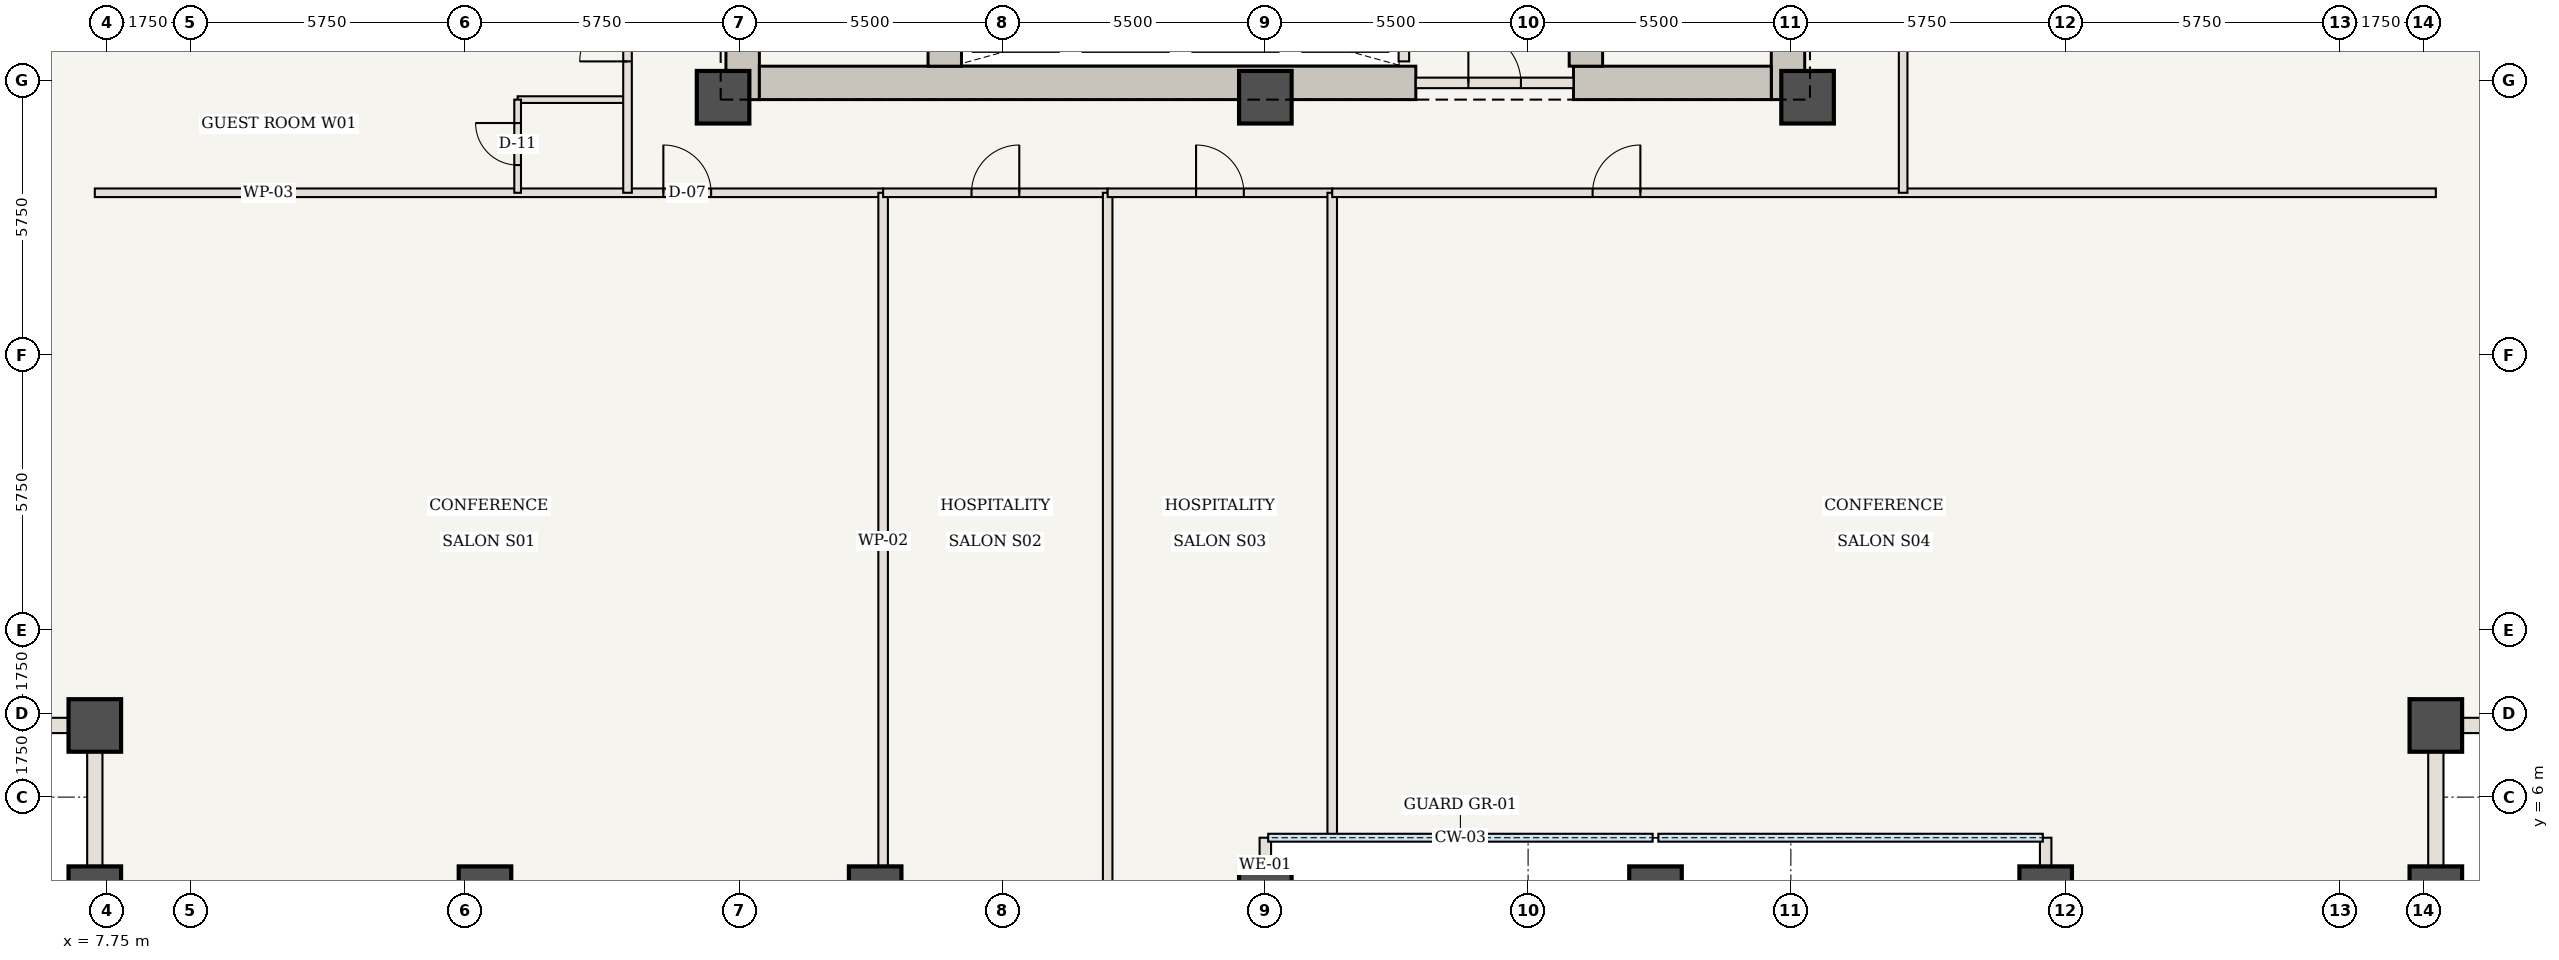
"""IFC4 building model, lengths in metres.
Left out: names, types, materials, properties, quantities, classifications, styles, units other than length and angle.
Written with IfcOpenShell. Run it as: python <this file> out.ifc"""

import sys

from ifc_helpers import new_model, si_unit, direction, frame, frame_2d, origin, origin_2d, place, context, subcontext, project, spatial, rectangle, extrude, element, fill, save


model = new_model("IFC4")
c1 = context("Model", 3, precision=1e-05, world=origin(), true_north=direction((0.0, 1.0)))
c2 = subcontext(c1, "Body", "Model", "MODEL_VIEW")
j1 = project(units=[si_unit("LENGTHUNIT", "METRE"), si_unit("PLANEANGLEUNIT", "RADIAN")], contexts=[c1])
p1 = place(None, origin())
s1 = spatial("IfcSite", under=j1, at=p1, CompositionType="ELEMENT")
p2 = place(p1, origin())
s2 = spatial("IfcBuilding", under=s1, at=p2, CompositionType="ELEMENT")
p3 = place(p2, frame((0.0, 0.0, 63.35)))
s3 = spatial("IfcBuildingStorey", under=s2, at=p3, CompositionType="ELEMENT", Elevation=63.35)
p4 = place(p3, frame((21.06, 20.6, 0.0), z_axis=(0.0, 0.0, 1.0), x_axis=(0.0, 1.0, 0.0)))
e1 = element("IfcWall", 1, at=p4, inside=s3, PredefinedType="SHEAR", context=c2, shape_type="SweptSolid", body=[
    extrude(rectangle(XDim=10.0, YDim=0.7, at=frame_2d((5.0, 0.0))), origin(), (0.0, 0.0, 1.0), 3.5),
])
p5 = place(p4, frame((1.15, 0.0, 0.0)))
e2 = element("IfcOpeningElement", 2, at=p5, cuts=e1, PredefinedType="OPENING", context=c2, shape_type="SweptSolid", body=[
    extrude(rectangle(XDim=1.15, YDim=2.15, at=frame_2d((0.575, 1.075))), frame((0.0, 0.36, 0.0), z_axis=(0.0, -1.0, 0.0), x_axis=(1.0, 0.0, 0.0)), (0.0, 0.0, 1.0), 0.72),
])
p6 = place(p3, frame((42.94, 20.6, 0.0), z_axis=(0.0, 0.0, 1.0), x_axis=(0.0, 1.0, 0.0)))
e3 = element("IfcWall", 3, at=p6, inside=s3, PredefinedType="SHEAR", context=c2, shape_type="SweptSolid", body=[
    extrude(rectangle(XDim=10.0, YDim=0.7, at=frame_2d((5.0, 0.0))), origin(), (0.0, 0.0, 1.0), 3.5),
])
p7 = place(p6, frame((1.15, 0.0, 0.0)))
e4 = element("IfcOpeningElement", 4, at=p7, cuts=e3, PredefinedType="OPENING", context=c2, shape_type="SweptSolid", body=[
    extrude(rectangle(XDim=1.15, YDim=2.15, at=frame_2d((0.575, 1.075))), frame((0.0, 0.36, 0.0), z_axis=(0.0, -1.0, 0.0), x_axis=(1.0, 0.0, 0.0)), (0.0, 0.0, 1.0), 0.72),
])
p8 = place(p3, frame((21.41, 20.95, 0.0), z_axis=(0.0, 0.0, 1.0), x_axis=(1.0, 0.0, 0.0)))
e5 = element("IfcWall", 5, at=p8, inside=s3, PredefinedType="SHEAR", context=c2, shape_type="SweptSolid", body=[
    extrude(rectangle(XDim=13.74, YDim=0.7, at=frame_2d((6.87, 0.0))), origin(), (0.0, 0.0, 1.0), 3.5),
])
p9 = place(p3, frame((38.45, 20.95, 0.0), z_axis=(0.0, 0.0, 1.0), x_axis=(1.0, 0.0, 0.0)))
e6 = element("IfcWall", 6, at=p9, inside=s3, PredefinedType="SHEAR", context=c2, shape_type="SweptSolid", body=[
    extrude(rectangle(XDim=4.14, YDim=0.7, at=frame_2d((2.07, 0.0))), origin(), (0.0, 0.0, 1.0), 3.5),
])
for number, where, z_axis, x_axis in (
    (7, (25.29, 21.3, 0.0), (0.0, 0.0, 1.0), (0.0, 1.0, 0.0)),
    (8, (38.71, 21.3, 0.0), (0.0, 0.0, 1.0), (0.0, 1.0, 0.0)),
):
    element("IfcWall", number, at=place(p3, frame(where, z_axis=z_axis, x_axis=x_axis)), inside=s3, PredefinedType="SHEAR", context=c2, shape_type="SweptSolid", body=[
        extrude(rectangle(XDim=9.3, YDim=0.7, at=frame_2d((4.65, 0.0))), origin(), (0.0, 0.0, 1.0), 3.5),
    ])
for number, where, z_axis, x_axis in (
    (9, (20.65, 20.65, 0.0), (0.0, 0.0, 1.0), (1.0, 0.0, 0.0)),
    (10, (32.0, 20.65, 0.0), (0.0, 0.0, 1.0), (1.0, 0.0, 0.0)),
    (11, (43.35, 20.65, 0.0), (0.0, 0.0, 1.0), (1.0, 0.0, 0.0)),
    (12, (7.5, 4.0, 0.0), (0.0, 0.0, 1.0), (1.0, 0.0, 0.0)),
    (13, (7.5, 7.5, 0.0), (0.0, 0.0, 1.0), (1.0, 0.0, 0.0)),
    (14, (56.5, 4.0, 0.0), (0.0, 0.0, 1.0), (1.0, 0.0, 0.0)),
    (15, (56.5, 7.5, 0.0), (0.0, 0.0, 1.0), (1.0, 0.0, 0.0)),
    (16, (15.667, 4.0, 0.0), (0.0, 0.0, 1.0), (1.0, 0.0, 0.0)),
    (17, (23.833, 4.0, 0.0), (0.0, 0.0, 1.0), (1.0, 0.0, 0.0)),
    (18, (32.0, 4.0, 0.0), (0.0, 0.0, 1.0), (1.0, 0.0, 0.0)),
    (19, (40.167, 4.0, 0.0), (0.0, 0.0, 1.0), (1.0, 0.0, 0.0)),
    (20, (48.333, 4.0, 0.0), (0.0, 0.0, 1.0), (1.0, 0.0, 0.0)),
):
    element("IfcColumn", number, at=place(p3, frame(where, z_axis=z_axis, x_axis=x_axis)), inside=s3, PredefinedType="COLUMN", context=c2, shape_type="SweptSolid", body=[
        extrude(rectangle(XDim=1.1, YDim=1.1, at=origin_2d()), origin(), (0.0, 0.0, 1.0), 3.5),
    ])
p10 = place(p3, frame((35.15, 20.95, 0.0), z_axis=(0.0, 0.0, 1.0), x_axis=(1.0, 0.0, 0.0)))
e21 = element("IfcWall", 21, at=p10, inside=s3, PredefinedType="STANDARD", context=c2, shape_type="SweptSolid", body=[
    extrude(rectangle(XDim=3.3, YDim=0.22, at=frame_2d((1.65, 0.0))), origin(), (0.0, 0.0, 1.0), 3.32),
])
p11 = place(p10, frame((1.1, 0.0, 0.0)))
e22 = element("IfcOpeningElement", 22, at=p11, cuts=e21, PredefinedType="OPENING", context=c2, shape_type="SweptSolid", body=[
    extrude(rectangle(XDim=1.1, YDim=2.15, at=frame_2d((0.55, 1.075))), frame((0.0, 0.12, 0.0), z_axis=(0.0, -1.0, 0.0), x_axis=(1.0, 0.0, 0.0)), (0.0, 0.0, 1.0), 0.24),
])
p12 = place(p3, frame((34.9, 21.4, 0.0), z_axis=(0.0, 0.0, 1.0), x_axis=(0.0, 1.0, 0.0)))
e23 = element("IfcWall", 23, at=p12, inside=s3, PredefinedType="STANDARD", context=c2, shape_type="SweptSolid", body=[
    extrude(rectangle(XDim=2.6, YDim=0.22, at=frame_2d((1.3, 0.0))), origin(), (0.0, 0.0, 1.0), 3.32),
])
p13 = place(p3, frame((7.5, 18.65, 0.0), z_axis=(0.0, 0.0, 1.0), x_axis=(1.0, 0.0, 0.0)))
e24 = element("IfcWall", 24, at=p13, inside=s3, PredefinedType="STANDARD", context=c2, shape_type="SweptSolid", body=[
    extrude(rectangle(XDim=16.5, YDim=0.18, at=frame_2d((8.25, 0.0))), origin(), (0.0, 0.0, 1.0), 3.32),
])
p14 = place(p13, frame((11.9, 0.0, 0.0)))
e25 = element("IfcOpeningElement", 25, at=p14, cuts=e24, PredefinedType="OPENING", context=c2, shape_type="SweptSolid", body=[
    extrude(rectangle(XDim=1.0, YDim=2.15, at=frame_2d((0.5, 1.075))), frame((0.0, 0.1, 0.0), z_axis=(0.0, -1.0, 0.0), x_axis=(1.0, 0.0, 0.0)), (0.0, 0.0, 1.0), 0.2),
])
p15 = place(p3, frame((24.0, 4.06, 0.0), z_axis=(0.0, 0.0, 1.0), x_axis=(0.0, 1.0, 0.0)))
e26 = element("IfcWall", 26, at=p15, inside=s3, PredefinedType="STANDARD", context=c2, shape_type="SweptSolid", body=[
    extrude(rectangle(XDim=14.59, YDim=0.2, at=frame_2d((7.295, 0.0))), origin(), (0.0, 0.0, 1.0), 3.32),
])
p16 = place(p3, frame((24.0, 18.65, 0.0), z_axis=(0.0, 0.0, 1.0), x_axis=(1.0, 0.0, 0.0)))
e27 = element("IfcWall", 27, at=p16, inside=s3, PredefinedType="STANDARD", context=c2, shape_type="SweptSolid", body=[
    extrude(rectangle(XDim=4.7, YDim=0.18, at=frame_2d((2.35, 0.0))), origin(), (0.0, 0.0, 1.0), 3.32),
])
p17 = place(p16, frame((1.85, 0.0, 0.0)))
e28 = element("IfcOpeningElement", 28, at=p17, cuts=e27, PredefinedType="OPENING", context=c2, shape_type="SweptSolid", body=[
    extrude(rectangle(XDim=1.0, YDim=2.15, at=frame_2d((0.5, 1.075))), frame((0.0, 0.1, 0.0), z_axis=(0.0, -1.0, 0.0), x_axis=(1.0, 0.0, 0.0)), (0.0, 0.0, 1.0), 0.2),
])
p18 = place(p3, frame((28.7, 4.06, 0.0), z_axis=(0.0, 0.0, 1.0), x_axis=(0.0, 1.0, 0.0)))
e29 = element("IfcWall", 29, at=p18, inside=s3, PredefinedType="STANDARD", context=c2, shape_type="SweptSolid", body=[
    extrude(rectangle(XDim=14.59, YDim=0.2, at=frame_2d((7.295, 0.0))), origin(), (0.0, 0.0, 1.0), 3.32),
])
p19 = place(p3, frame((28.7, 18.65, 0.0), z_axis=(0.0, 0.0, 1.0), x_axis=(1.0, 0.0, 0.0)))
e30 = element("IfcWall", 30, at=p19, inside=s3, PredefinedType="STANDARD", context=c2, shape_type="SweptSolid", body=[
    extrude(rectangle(XDim=4.7, YDim=0.18, at=frame_2d((2.35, 0.0))), origin(), (0.0, 0.0, 1.0), 3.32),
])
p20 = place(p19, frame((1.85, 0.0, 0.0)))
e31 = element("IfcOpeningElement", 31, at=p20, cuts=e30, PredefinedType="OPENING", context=c2, shape_type="SweptSolid", body=[
    extrude(rectangle(XDim=1.0, YDim=2.15, at=frame_2d((0.5, 1.075))), frame((0.0, 0.1, 0.0), z_axis=(0.0, -1.0, 0.0), x_axis=(1.0, 0.0, 0.0)), (0.0, 0.0, 1.0), 0.2),
])
p21 = place(p3, frame((33.4, 5.16, 0.0), z_axis=(0.0, 0.0, 1.0), x_axis=(0.0, 1.0, 0.0)))
e32 = element("IfcWall", 32, at=p21, inside=s3, PredefinedType="STANDARD", context=c2, shape_type="SweptSolid", body=[
    extrude(rectangle(XDim=13.49, YDim=0.2, at=frame_2d((6.745, 0.0))), origin(), (0.0, 0.0, 1.0), 3.32),
])
p22 = place(p3, frame((33.4, 18.65, 0.0), z_axis=(0.0, 0.0, 1.0), x_axis=(1.0, 0.0, 0.0)))
e33 = element("IfcWall", 33, at=p22, inside=s3, PredefinedType="STANDARD", context=c2, shape_type="SweptSolid", body=[
    extrude(rectangle(XDim=23.1, YDim=0.18, at=frame_2d((11.55, 0.0))), origin(), (0.0, 0.0, 1.0), 3.32),
])
p23 = place(p22, frame((5.45, 0.0, 0.0)))
e34 = element("IfcOpeningElement", 34, at=p23, cuts=e33, PredefinedType="OPENING", context=c2, shape_type="SweptSolid", body=[
    extrude(rectangle(XDim=1.0, YDim=2.15, at=frame_2d((0.5, 1.075))), frame((0.0, 0.1, 0.0), z_axis=(0.0, -1.0, 0.0), x_axis=(1.0, 0.0, 0.0)), (0.0, 0.0, 1.0), 0.2),
])
p24 = place(p3, frame((16.35, 20.6, 0.0), z_axis=(0.0, 0.0, 1.0), x_axis=(1.0, 0.0, 0.0)))
e35 = element("IfcWall", 35, at=p24, inside=s3, PredefinedType="STANDARD", context=c2, shape_type="SweptSolid", body=[
    extrude(rectangle(XDim=2.3, YDim=0.14, at=frame_2d((1.15, 0.0))), origin(), (0.0, 0.0, 1.0), 2.615),
])
p25 = place(p3, frame((16.35, 18.65, 0.0), z_axis=(0.0, 0.0, 1.0), x_axis=(0.0, 1.0, 0.0)))
e36 = element("IfcWall", 36, at=p25, inside=s3, PredefinedType="STANDARD", context=c2, shape_type="SweptSolid", body=[
    extrude(rectangle(XDim=1.95, YDim=0.14, at=frame_2d((0.975, 0.0))), origin(), (0.0, 0.0, 1.0), 3.32),
])
p26 = place(p25, frame((0.58, 0.0, 0.0)))
e37 = element("IfcOpeningElement", 37, at=p26, cuts=e36, PredefinedType="OPENING", context=c2, shape_type="SweptSolid", body=[
    extrude(rectangle(XDim=0.88, YDim=2.1, at=frame_2d((0.44, 1.05))), frame((0.0, 0.08, 0.0), z_axis=(0.0, -1.0, 0.0), x_axis=(1.0, 0.0, 0.0)), (0.0, 0.0, 1.0), 0.16),
])
p27 = place(p3, frame((18.65, 18.65, 0.0), z_axis=(0.0, 0.0, 1.0), x_axis=(0.0, 1.0, 0.0)))
e38 = element("IfcWall", 38, at=p27, inside=s3, PredefinedType="STANDARD", context=c2, shape_type="SweptSolid", body=[
    extrude(rectangle(XDim=4.65, YDim=0.18, at=frame_2d((2.325, 0.0))), origin(), (0.0, 0.0, 1.0), 3.32),
])
p28 = place(p27, frame((2.75, 0.0, 0.0)))
e39 = element("IfcOpeningElement", 39, at=p28, cuts=e38, PredefinedType="OPENING", context=c2, shape_type="SweptSolid", body=[
    extrude(rectangle(XDim=1.0, YDim=2.15, at=frame_2d((0.5, 1.075))), frame((0.0, 0.1, 0.0), z_axis=(0.0, -1.0, 0.0), x_axis=(1.0, 0.0, 0.0)), (0.0, 0.0, 1.0), 0.2),
])
p29 = place(p3, frame((45.35, 18.65, 0.0), z_axis=(0.0, 0.0, 1.0), x_axis=(0.0, 1.0, 0.0)))
e40 = element("IfcWall", 40, at=p29, inside=s3, PredefinedType="STANDARD", context=c2, shape_type="SweptSolid", body=[
    extrude(rectangle(XDim=8.85, YDim=0.18, at=frame_2d((4.425, 0.0))), origin(), (0.0, 0.0, 1.0), 3.32),
])
p30 = place(p29, frame((3.925, 0.0, 0.0)))
e41 = element("IfcOpeningElement", 41, at=p30, cuts=e40, PredefinedType="OPENING", context=c2, shape_type="SweptSolid", body=[
    extrude(rectangle(XDim=1.0, YDim=2.15, at=frame_2d((0.5, 1.075))), frame((0.0, 0.1, 0.0), z_axis=(0.0, -1.0, 0.0), x_axis=(1.0, 0.0, 0.0)), (0.0, 0.0, 1.0), 0.2),
])
for number, where, z_axis, x_axis in (
    (42, (32.0, 4.0, 0.0), (0.0, 0.0, 1.0), (0.0, 1.0, 0.0)),
    (43, (48.333, 4.0, 0.0), (0.0, 0.0, 1.0), (0.0, 1.0, 0.0)),
):
    element("IfcWall", number, at=place(p3, frame(where, z_axis=z_axis, x_axis=x_axis)), inside=s3, PredefinedType="USERDEFINED", context=c2, shape_type="SweptSolid", body=[
        extrude(rectangle(XDim=1.15, YDim=0.24, at=frame_2d((0.575, 0.0))), origin(), (0.0, 0.0, 1.0), 2.52),
    ])
for number, where, z_axis, x_axis in (
    (44, (7.5, 4.0, 0.0), (0.0, 0.0, 1.0), (0.0, 1.0, 0.0)),
    (45, (7.5, 7.5, 0.0), (0.0, 0.0, 1.0), (-1.0, 0.0, 0.0)),
    (46, (56.5, 7.5, 0.0), (0.0, 0.0, 1.0), (0.0, -1.0, 0.0)),
    (47, (60.0, 7.5, 0.0), (0.0, 0.0, 1.0), (-1.0, 0.0, 0.0)),
):
    element("IfcWall", number, at=place(p3, frame(where, z_axis=z_axis, x_axis=x_axis)), inside=s3, PredefinedType="USERDEFINED", context=c2, shape_type="SweptSolid", body=[
        extrude(rectangle(XDim=3.5, YDim=0.32, at=frame_2d((1.75, 0.0))), origin(), (0.0, 0.0, 1.0), 2.52),
    ])
p31 = place(p11, origin())
e48 = element("IfcDoor", 48, at=p31, inside=s3, OperationType="SINGLE_SWING_LEFT", PredefinedType="DOOR", context=c2, shape_type="SweptSolid", body=[
    extrude(rectangle(XDim=1.1, YDim=2.15, at=frame_2d((0.55, 1.075))), frame((0.0, 0.025, 0.0), z_axis=(0.0, -1.0, 0.0), x_axis=(1.0, 0.0, 0.0)), (0.0, 0.0, 1.0), 0.05),
])
fill(e22, e48)
p32 = place(p14, origin())
e49 = element("IfcDoor", 49, at=p32, inside=s3, OperationType="SINGLE_SWING_LEFT", PredefinedType="DOOR", context=c2, shape_type="SweptSolid", body=[
    extrude(rectangle(XDim=1.0, YDim=2.15, at=frame_2d((0.5, 1.075))), frame((0.0, 0.025, 0.0), z_axis=(0.0, -1.0, 0.0), x_axis=(1.0, 0.0, 0.0)), (0.0, 0.0, 1.0), 0.05),
])
fill(e25, e49)
p33 = place(p17, origin())
e50 = element("IfcDoor", 50, at=p33, inside=s3, OperationType="SINGLE_SWING_RIGHT", PredefinedType="DOOR", context=c2, shape_type="SweptSolid", body=[
    extrude(rectangle(XDim=1.0, YDim=2.15, at=frame_2d((0.5, 1.075))), frame((0.0, 0.025, 0.0), z_axis=(0.0, -1.0, 0.0), x_axis=(1.0, 0.0, 0.0)), (0.0, 0.0, 1.0), 0.05),
])
fill(e28, e50)
p34 = place(p20, origin())
e51 = element("IfcDoor", 51, at=p34, inside=s3, OperationType="SINGLE_SWING_LEFT", PredefinedType="DOOR", context=c2, shape_type="SweptSolid", body=[
    extrude(rectangle(XDim=1.0, YDim=2.15, at=frame_2d((0.5, 1.075))), frame((0.0, 0.025, 0.0), z_axis=(0.0, -1.0, 0.0), x_axis=(1.0, 0.0, 0.0)), (0.0, 0.0, 1.0), 0.05),
])
fill(e31, e51)
p35 = place(p23, origin())
e52 = element("IfcDoor", 52, at=p35, inside=s3, OperationType="SINGLE_SWING_RIGHT", PredefinedType="DOOR", context=c2, shape_type="SweptSolid", body=[
    extrude(rectangle(XDim=1.0, YDim=2.15, at=frame_2d((0.5, 1.075))), frame((0.0, 0.025, 0.0), z_axis=(0.0, -1.0, 0.0), x_axis=(1.0, 0.0, 0.0)), (0.0, 0.0, 1.0), 0.05),
])
fill(e34, e52)
p36 = place(p26, origin())
e53 = element("IfcDoor", 53, at=p36, inside=s3, OperationType="SINGLE_SWING_RIGHT", PredefinedType="DOOR", context=c2, shape_type="SweptSolid", body=[
    extrude(rectangle(XDim=0.88, YDim=2.1, at=frame_2d((0.44, 1.05))), frame((0.0, 0.025, 0.0), z_axis=(0.0, -1.0, 0.0), x_axis=(1.0, 0.0, 0.0)), (0.0, 0.0, 1.0), 0.05),
])
fill(e37, e53)
p37 = place(p28, origin())
e54 = element("IfcDoor", 54, at=p37, inside=s3, OperationType="SINGLE_SWING_LEFT", PredefinedType="DOOR", context=c2, shape_type="SweptSolid", body=[
    extrude(rectangle(XDim=1.0, YDim=2.15, at=frame_2d((0.5, 1.075))), frame((0.0, 0.025, 0.0), z_axis=(0.0, -1.0, 0.0), x_axis=(1.0, 0.0, 0.0)), (0.0, 0.0, 1.0), 0.05),
])
fill(e39, e54)
save(model, sys.argv[1])
